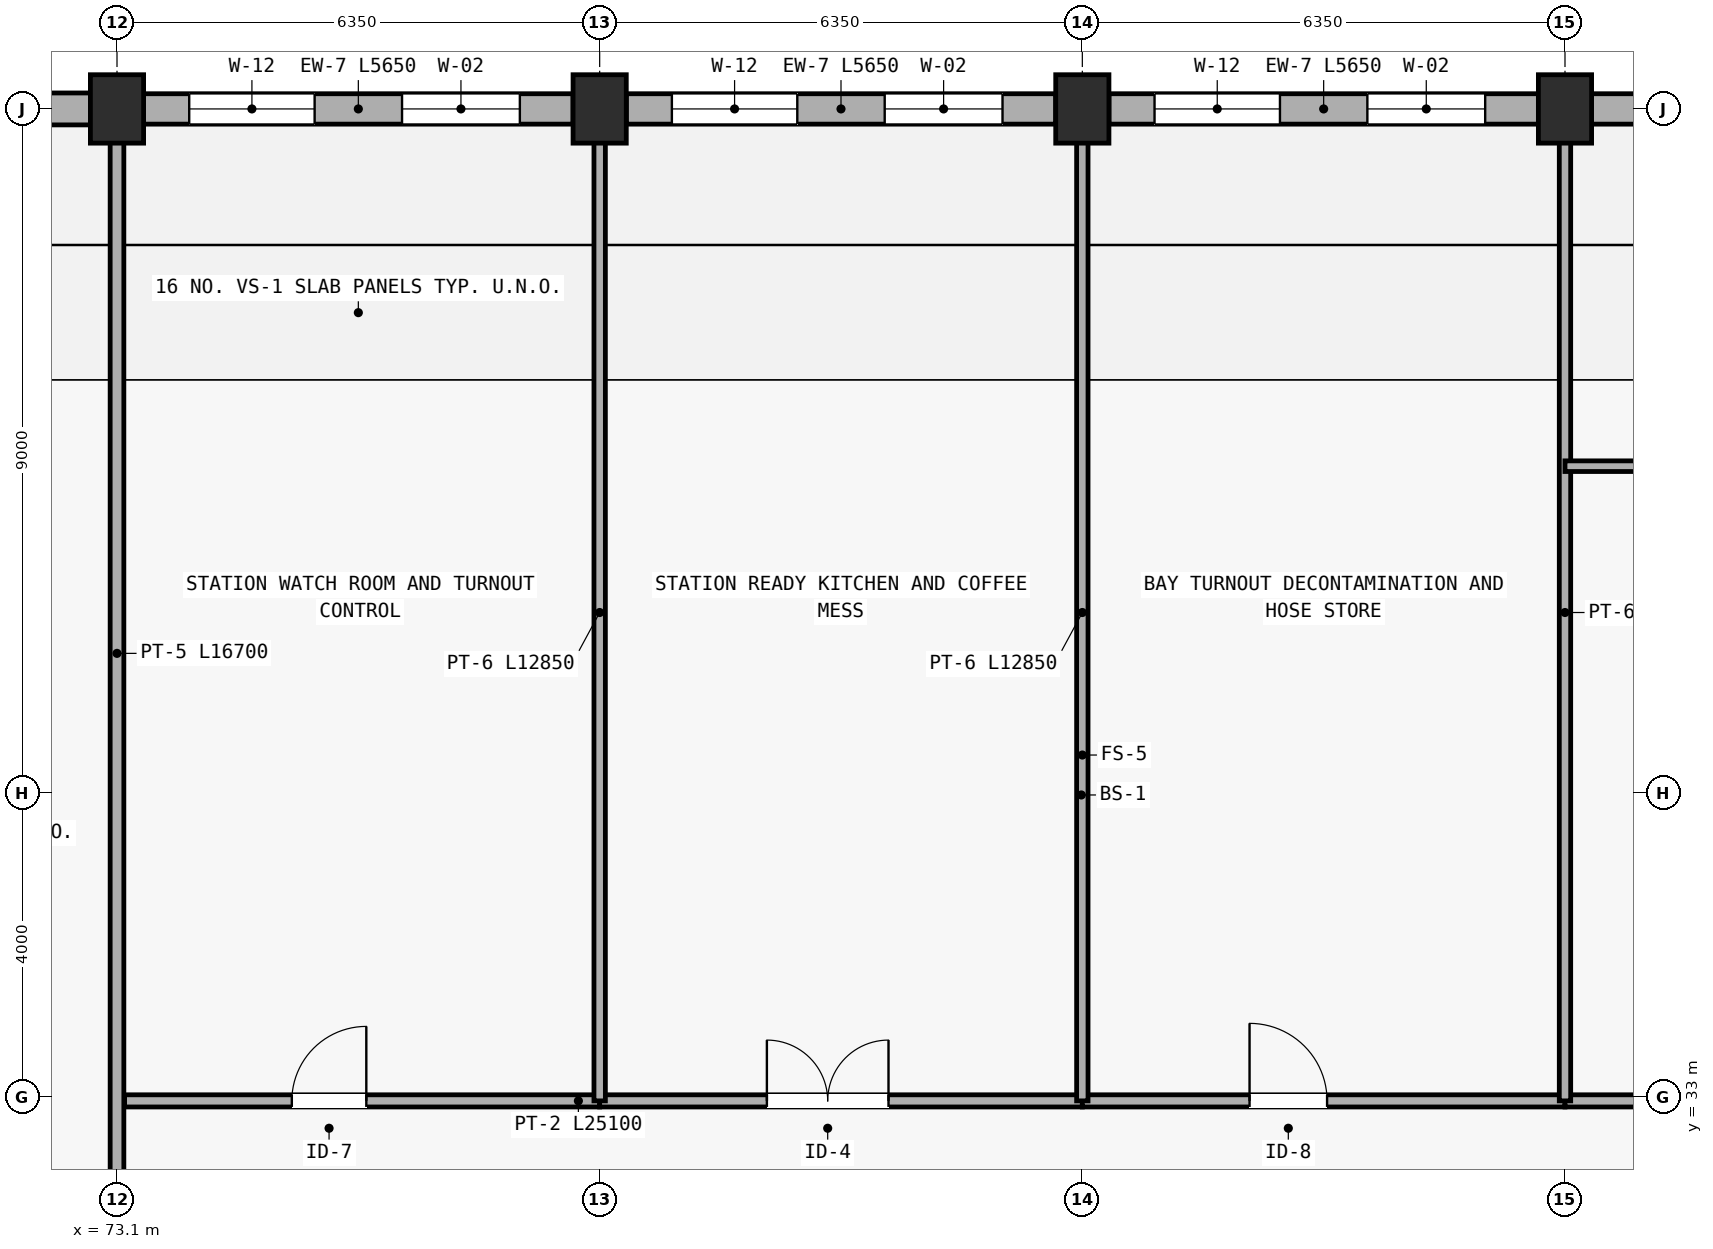
"""IFC4 building model, lengths in metres.
Left out: names, types, materials, properties, quantities, classifications, styles, units other than length and angle.
Written with IfcOpenShell. Run it as: python <this file> out.ifc"""

import sys

from ifc_helpers import new_model, si_unit, direction, frame, frame_2d, origin, origin_2d, place, context, subcontext, project, spatial, rectangle, extrude, element, fill, save


model = new_model("IFC4")
c1 = context("Model", 3, precision=1e-05, world=origin(), true_north=direction((0.0, 1.0)))
c2 = subcontext(c1, "Body", "Model", "MODEL_VIEW")
j1 = project(units=[si_unit("LENGTHUNIT", "METRE"), si_unit("PLANEANGLEUNIT", "RADIAN")], contexts=[c1])
p1 = place(None, origin())
s1 = spatial("IfcSite", under=j1, at=p1, CompositionType="ELEMENT")
p2 = place(p1, origin())
s2 = spatial("IfcBuilding", under=s1, at=p2, CompositionType="ELEMENT")
p3 = place(p2, origin())
s3 = spatial("IfcBuildingStorey", under=s2, at=p3, CompositionType="ELEMENT", Elevation=0.0)
for number, where, z_axis, x_axis in (
    (1, (73.1, 46.0, 0.0), (0.0, 0.0, 1.0), (1.0, 0.0, 0.0)),
    (2, (79.45, 46.0, 0.0), (0.0, 0.0, 1.0), (1.0, 0.0, 0.0)),
    (3, (85.8, 46.0, 0.0), (0.0, 0.0, 1.0), (1.0, 0.0, 0.0)),
    (4, (92.15, 46.0, 0.0), (0.0, 0.0, 1.0), (1.0, 0.0, 0.0)),
):
    element("IfcColumn", number, at=place(p3, frame(where, z_axis=z_axis, x_axis=x_axis)), inside=s3, PredefinedType="COLUMN", context=c2, shape_type="SweptSolid", body=[
        extrude(rectangle(XDim=0.7, YDim=0.9, at=origin_2d()), origin(), (0.0, 0.0, 1.0), 5.65),
    ])
p4 = place(p3, frame((72.75, 46.0, 0.0), z_axis=(0.0, 0.0, 1.0), x_axis=(-1.0, 0.0, 0.0)))
e5 = element("IfcWall", 5, at=p4, inside=s3, PredefinedType="STANDARD", context=c2, shape_type="SweptSolid", body=[
    extrude(rectangle(XDim=5.65, YDim=0.42, at=frame_2d((2.825, 0.0))), origin(), (0.0, 0.0, 1.0), 4.84),
])
p5 = place(p4, frame((0.675, 0.0, 0.0)))
e6 = element("IfcOpeningElement", 6, at=p5, cuts=e5, PredefinedType="OPENING", context=c2, shape_type="SweptSolid", body=[
    extrude(rectangle(XDim=4.3, YDim=4.4, at=frame_2d((2.15, 2.2))), frame((0.0, 0.22, 0.0), z_axis=(0.0, -1.0, 0.0), x_axis=(1.0, 0.0, 0.0)), (0.0, 0.0, 1.0), 0.44),
])
p6 = place(p3, frame((79.1, 46.0, 0.0), z_axis=(0.0, 0.0, 1.0), x_axis=(-1.0, 0.0, 0.0)))
e7 = element("IfcWall", 7, at=p6, inside=s3, PredefinedType="STANDARD", context=c2, shape_type="SweptSolid", body=[
    extrude(rectangle(XDim=5.65, YDim=0.4, at=frame_2d((2.825, 0.0))), origin(), (0.0, 0.0, 1.0), 3.8),
])
p7 = place(p6, frame((0.7, 0.0, 0.95)))
e8 = element("IfcOpeningElement", 8, at=p7, cuts=e7, PredefinedType="OPENING", context=c2, shape_type="SweptSolid", body=[
    extrude(rectangle(XDim=1.55, YDim=1.55, at=frame_2d((0.775, 0.775))), frame((0.0, 0.21, 0.0), z_axis=(0.0, -1.0, 0.0), x_axis=(1.0, 0.0, 0.0)), (0.0, 0.0, 1.0), 0.42),
])
p8 = place(p6, frame((3.4, 0.0, 0.95)))
e9 = element("IfcOpeningElement", 9, at=p8, cuts=e7, PredefinedType="OPENING", context=c2, shape_type="SweptSolid", body=[
    extrude(rectangle(XDim=1.65, YDim=1.45, at=frame_2d((0.825, 0.725))), frame((0.0, 0.21, 0.0), z_axis=(0.0, -1.0, 0.0), x_axis=(1.0, 0.0, 0.0)), (0.0, 0.0, 1.0), 0.42),
])
p9 = place(p3, frame((85.45, 46.0, 0.0), z_axis=(0.0, 0.0, 1.0), x_axis=(-1.0, 0.0, 0.0)))
e10 = element("IfcWall", 10, at=p9, inside=s3, PredefinedType="STANDARD", context=c2, shape_type="SweptSolid", body=[
    extrude(rectangle(XDim=5.65, YDim=0.4, at=frame_2d((2.825, 0.0))), origin(), (0.0, 0.0, 1.0), 3.8),
])
p10 = place(p9, frame((0.7, 0.0, 0.95)))
e11 = element("IfcOpeningElement", 11, at=p10, cuts=e10, PredefinedType="OPENING", context=c2, shape_type="SweptSolid", body=[
    extrude(rectangle(XDim=1.55, YDim=1.55, at=frame_2d((0.775, 0.775))), frame((0.0, 0.21, 0.0), z_axis=(0.0, -1.0, 0.0), x_axis=(1.0, 0.0, 0.0)), (0.0, 0.0, 1.0), 0.42),
])
p11 = place(p9, frame((3.4, 0.0, 0.95)))
e12 = element("IfcOpeningElement", 12, at=p11, cuts=e10, PredefinedType="OPENING", context=c2, shape_type="SweptSolid", body=[
    extrude(rectangle(XDim=1.65, YDim=1.45, at=frame_2d((0.825, 0.725))), frame((0.0, 0.21, 0.0), z_axis=(0.0, -1.0, 0.0), x_axis=(1.0, 0.0, 0.0)), (0.0, 0.0, 1.0), 0.42),
])
p12 = place(p3, frame((91.8, 46.0, 0.0), z_axis=(0.0, 0.0, 1.0), x_axis=(-1.0, 0.0, 0.0)))
e13 = element("IfcWall", 13, at=p12, inside=s3, PredefinedType="STANDARD", context=c2, shape_type="SweptSolid", body=[
    extrude(rectangle(XDim=5.65, YDim=0.4, at=frame_2d((2.825, 0.0))), origin(), (0.0, 0.0, 1.0), 3.8),
])
p13 = place(p12, frame((0.7, 0.0, 0.95)))
e14 = element("IfcOpeningElement", 14, at=p13, cuts=e13, PredefinedType="OPENING", context=c2, shape_type="SweptSolid", body=[
    extrude(rectangle(XDim=1.55, YDim=1.55, at=frame_2d((0.775, 0.775))), frame((0.0, 0.21, 0.0), z_axis=(0.0, -1.0, 0.0), x_axis=(1.0, 0.0, 0.0)), (0.0, 0.0, 1.0), 0.42),
])
p14 = place(p12, frame((3.4, 0.0, 0.95)))
e15 = element("IfcOpeningElement", 15, at=p14, cuts=e13, PredefinedType="OPENING", context=c2, shape_type="SweptSolid", body=[
    extrude(rectangle(XDim=1.65, YDim=1.45, at=frame_2d((0.825, 0.725))), frame((0.0, 0.21, 0.0), z_axis=(0.0, -1.0, 0.0), x_axis=(1.0, 0.0, 0.0)), (0.0, 0.0, 1.0), 0.42),
])
p15 = place(p3, frame((98.15, 46.0, 0.0), z_axis=(0.0, 0.0, 1.0), x_axis=(-1.0, 0.0, 0.0)))
e16 = element("IfcWall", 16, at=p15, inside=s3, PredefinedType="STANDARD", context=c2, shape_type="SweptSolid", body=[
    extrude(rectangle(XDim=5.65, YDim=0.4, at=frame_2d((2.825, 0.0))), origin(), (0.0, 0.0, 1.0), 3.8),
])
p16 = place(p15, frame((0.7, 0.0, 0.95)))
e17 = element("IfcOpeningElement", 17, at=p16, cuts=e16, PredefinedType="OPENING", context=c2, shape_type="SweptSolid", body=[
    extrude(rectangle(XDim=1.55, YDim=1.55, at=frame_2d((0.775, 0.775))), frame((0.0, 0.21, 0.0), z_axis=(0.0, -1.0, 0.0), x_axis=(1.0, 0.0, 0.0)), (0.0, 0.0, 1.0), 0.42),
])
p17 = place(p15, frame((3.4, 0.0, 0.95)))
e18 = element("IfcOpeningElement", 18, at=p17, cuts=e16, PredefinedType="OPENING", context=c2, shape_type="SweptSolid", body=[
    extrude(rectangle(XDim=1.65, YDim=1.45, at=frame_2d((0.825, 0.725))), frame((0.0, 0.21, 0.0), z_axis=(0.0, -1.0, 0.0), x_axis=(1.0, 0.0, 0.0)), (0.0, 0.0, 1.0), 0.42),
])
p18 = place(p3, frame((73.1, 29.1, 0.0), z_axis=(0.0, 0.0, 1.0), x_axis=(0.0, 1.0, 0.0)))
e19 = element("IfcWall", 19, at=p18, inside=s3, PredefinedType="PARTITIONING", context=c2, shape_type="SweptSolid", body=[
    extrude(rectangle(XDim=16.7, YDim=0.18, at=frame_2d((8.35, 0.0))), origin(), (0.0, 0.0, 1.0), 3.928),
])
p19 = place(p18, frame((1.4, 0.0, 0.0)))
e20 = element("IfcOpeningElement", 20, at=p19, cuts=e19, PredefinedType="OPENING", context=c2, shape_type="SweptSolid", body=[
    extrude(rectangle(XDim=1.05, YDim=2.14, at=frame_2d((0.525, 1.07))), frame((0.0, 0.1, 0.0), z_axis=(0.0, -1.0, 0.0), x_axis=(1.0, 0.0, 0.0)), (0.0, 0.0, 1.0), 0.2),
])
p20 = place(p3, frame((73.2, 32.95, 0.0), z_axis=(0.0, 0.0, 1.0), x_axis=(1.0, 0.0, 0.0)))
e21 = element("IfcWall", 21, at=p20, inside=s3, PredefinedType="PARTITIONING", context=c2, shape_type="SweptSolid", body=[
    extrude(rectangle(XDim=6.25, YDim=0.16, at=frame_2d((3.125, 0.0))), origin(), (0.0, 0.0, 1.0), 4.4),
])
p21 = place(p20, frame((2.2, 0.0, 0.0)))
e22 = element("IfcOpeningElement", 22, at=p21, cuts=e21, PredefinedType="OPENING", context=c2, shape_type="SweptSolid", body=[
    extrude(rectangle(XDim=0.98, YDim=2.12, at=frame_2d((0.49, 1.06))), frame((0.0, 0.09, 0.0), z_axis=(0.0, -1.0, 0.0), x_axis=(1.0, 0.0, 0.0)), (0.0, 0.0, 1.0), 0.18),
])
p22 = place(p3, frame((79.45, 32.95, 0.0), z_axis=(0.0, 0.0, 1.0), x_axis=(1.0, 0.0, 0.0)))
e23 = element("IfcWall", 23, at=p22, inside=s3, PredefinedType="PARTITIONING", context=c2, shape_type="SweptSolid", body=[
    extrude(rectangle(XDim=6.35, YDim=0.16, at=frame_2d((3.175, 0.0))), origin(), (0.0, 0.0, 1.0), 4.4),
])
p23 = place(p22, frame((2.2, 0.0, 0.0)))
e24 = element("IfcOpeningElement", 24, at=p23, cuts=e23, PredefinedType="OPENING", context=c2, shape_type="SweptSolid", body=[
    extrude(rectangle(XDim=1.6, YDim=2.14, at=frame_2d((0.8, 1.07))), frame((0.0, 0.09, 0.0), z_axis=(0.0, -1.0, 0.0), x_axis=(1.0, 0.0, 0.0)), (0.0, 0.0, 1.0), 0.18),
])
p24 = place(p3, frame((85.8, 32.95, 0.0), z_axis=(0.0, 0.0, 1.0), x_axis=(1.0, 0.0, 0.0)))
e25 = element("IfcWall", 25, at=p24, inside=s3, PredefinedType="PARTITIONING", context=c2, shape_type="SweptSolid", body=[
    extrude(rectangle(XDim=6.35, YDim=0.16, at=frame_2d((3.175, 0.0))), origin(), (0.0, 0.0, 1.0), 4.4),
])
p25 = place(p24, frame((2.2, 0.0, 0.0)))
e26 = element("IfcOpeningElement", 26, at=p25, cuts=e25, PredefinedType="OPENING", context=c2, shape_type="SweptSolid", body=[
    extrude(rectangle(XDim=1.02, YDim=2.14, at=frame_2d((0.51, 1.07))), frame((0.0, 0.09, 0.0), z_axis=(0.0, -1.0, 0.0), x_axis=(1.0, 0.0, 0.0)), (0.0, 0.0, 1.0), 0.18),
])
p26 = place(p3, frame((92.15, 32.95, 0.0), z_axis=(0.0, 0.0, 1.0), x_axis=(1.0, 0.0, 0.0)))
e27 = element("IfcWall", 27, at=p26, inside=s3, PredefinedType="PARTITIONING", context=c2, shape_type="SweptSolid", body=[
    extrude(rectangle(XDim=6.15, YDim=0.16, at=frame_2d((3.075, 0.0))), origin(), (0.0, 0.0, 1.0), 4.4),
])
p27 = place(p26, frame((2.2, 0.0, 0.0)))
e28 = element("IfcOpeningElement", 28, at=p27, cuts=e27, PredefinedType="OPENING", context=c2, shape_type="SweptSolid", body=[
    extrude(rectangle(XDim=1.0, YDim=2.12, at=frame_2d((0.5, 1.06))), frame((0.0, 0.09, 0.0), z_axis=(0.0, -1.0, 0.0), x_axis=(1.0, 0.0, 0.0)), (0.0, 0.0, 1.0), 0.18),
])
for number, where, z_axis, x_axis in (
    (29, (79.45, 32.95, 0.0), (0.0, 0.0, 1.0), (0.0, 1.0, 0.0)),
    (30, (85.8, 32.95, 0.0), (0.0, 0.0, 1.0), (0.0, 1.0, 0.0)),
    (31, (92.15, 32.95, 0.0), (0.0, 0.0, 1.0), (0.0, 1.0, 0.0)),
):
    element("IfcWall", number, at=place(p3, frame(where, z_axis=z_axis, x_axis=x_axis)), inside=s3, PredefinedType="PARTITIONING", context=c2, shape_type="SweptSolid", body=[
        extrude(rectangle(XDim=12.85, YDim=0.15, at=frame_2d((6.425, 0.0))), origin(), (0.0, 0.0, 1.0), 3.928),
    ])
p28 = place(p3, frame((92.15, 41.3, 0.0), z_axis=(0.0, 0.0, 1.0), x_axis=(1.0, 0.0, 0.0)))
e32 = element("IfcWall", 32, at=p28, inside=s3, PredefinedType="PARTITIONING", context=c2, shape_type="SweptSolid", body=[
    extrude(rectangle(XDim=6.15, YDim=0.14, at=frame_2d((3.075, 0.0))), origin(), (0.0, 0.0, 1.0), 4.4),
])
p29 = place(p28, frame((2.2, 0.0, 0.0)))
e33 = element("IfcOpeningElement", 33, at=p29, cuts=e32, PredefinedType="OPENING", context=c2, shape_type="SweptSolid", body=[
    extrude(rectangle(XDim=0.9, YDim=2.08, at=frame_2d((0.45, 1.04))), frame((0.0, 0.08, 0.0), z_axis=(0.0, -1.0, 0.0), x_axis=(1.0, 0.0, 0.0)), (0.0, 0.0, 1.0), 0.16),
])
p30 = place(p7, origin())
e34 = element("IfcWindow", 34, at=p30, inside=s3, PartitioningType="DOUBLE_PANEL_VERTICAL", PredefinedType="WINDOW", context=c2, shape_type="SweptSolid", body=[
    extrude(rectangle(XDim=1.55, YDim=1.55, at=frame_2d((0.775, 0.775))), frame((0.0, 0.03, 0.0), z_axis=(0.0, -1.0, 0.0), x_axis=(1.0, 0.0, 0.0)), (0.0, 0.0, 1.0), 0.06),
])
fill(e8, e34)
p31 = place(p8, origin())
e35 = element("IfcWindow", 35, at=p31, inside=s3, PartitioningType="DOUBLE_PANEL_VERTICAL", PredefinedType="WINDOW", context=c2, shape_type="SweptSolid", body=[
    extrude(rectangle(XDim=1.65, YDim=1.45, at=frame_2d((0.825, 0.725))), frame((0.0, 0.03, 0.0), z_axis=(0.0, -1.0, 0.0), x_axis=(1.0, 0.0, 0.0)), (0.0, 0.0, 1.0), 0.06),
])
fill(e9, e35)
p32 = place(p10, origin())
e36 = element("IfcWindow", 36, at=p32, inside=s3, PartitioningType="DOUBLE_PANEL_VERTICAL", PredefinedType="WINDOW", context=c2, shape_type="SweptSolid", body=[
    extrude(rectangle(XDim=1.55, YDim=1.55, at=frame_2d((0.775, 0.775))), frame((0.0, 0.03, 0.0), z_axis=(0.0, -1.0, 0.0), x_axis=(1.0, 0.0, 0.0)), (0.0, 0.0, 1.0), 0.06),
])
fill(e11, e36)
p33 = place(p11, origin())
e37 = element("IfcWindow", 37, at=p33, inside=s3, PartitioningType="DOUBLE_PANEL_VERTICAL", PredefinedType="WINDOW", context=c2, shape_type="SweptSolid", body=[
    extrude(rectangle(XDim=1.65, YDim=1.45, at=frame_2d((0.825, 0.725))), frame((0.0, 0.03, 0.0), z_axis=(0.0, -1.0, 0.0), x_axis=(1.0, 0.0, 0.0)), (0.0, 0.0, 1.0), 0.06),
])
fill(e12, e37)
p34 = place(p13, origin())
e38 = element("IfcWindow", 38, at=p34, inside=s3, PartitioningType="DOUBLE_PANEL_VERTICAL", PredefinedType="WINDOW", context=c2, shape_type="SweptSolid", body=[
    extrude(rectangle(XDim=1.55, YDim=1.55, at=frame_2d((0.775, 0.775))), frame((0.0, 0.03, 0.0), z_axis=(0.0, -1.0, 0.0), x_axis=(1.0, 0.0, 0.0)), (0.0, 0.0, 1.0), 0.06),
])
fill(e14, e38)
p35 = place(p14, origin())
e39 = element("IfcWindow", 39, at=p35, inside=s3, PartitioningType="DOUBLE_PANEL_VERTICAL", PredefinedType="WINDOW", context=c2, shape_type="SweptSolid", body=[
    extrude(rectangle(XDim=1.65, YDim=1.45, at=frame_2d((0.825, 0.725))), frame((0.0, 0.03, 0.0), z_axis=(0.0, -1.0, 0.0), x_axis=(1.0, 0.0, 0.0)), (0.0, 0.0, 1.0), 0.06),
])
fill(e15, e39)
p36 = place(p21, origin())
e40 = element("IfcDoor", 40, at=p36, inside=s3, OperationType="SINGLE_SWING_RIGHT", PredefinedType="DOOR", context=c2, shape_type="SweptSolid", body=[
    extrude(rectangle(XDim=0.98, YDim=2.12, at=frame_2d((0.49, 1.06))), frame((0.0, 0.025, 0.0), z_axis=(0.0, -1.0, 0.0), x_axis=(1.0, 0.0, 0.0)), (0.0, 0.0, 1.0), 0.05),
])
fill(e22, e40)
p37 = place(p23, origin())
e41 = element("IfcDoor", 41, at=p37, inside=s3, OperationType="DOUBLE_DOOR_SINGLE_SWING", PredefinedType="DOOR", context=c2, shape_type="SweptSolid", body=[
    extrude(rectangle(XDim=1.6, YDim=2.14, at=frame_2d((0.8, 1.07))), frame((0.0, 0.025, 0.0), z_axis=(0.0, -1.0, 0.0), x_axis=(1.0, 0.0, 0.0)), (0.0, 0.0, 1.0), 0.05),
])
fill(e24, e41)
p38 = place(p25, origin())
e42 = element("IfcDoor", 42, at=p38, inside=s3, OperationType="SINGLE_SWING_LEFT", PredefinedType="DOOR", context=c2, shape_type="SweptSolid", body=[
    extrude(rectangle(XDim=1.02, YDim=2.14, at=frame_2d((0.51, 1.07))), frame((0.0, 0.025, 0.0), z_axis=(0.0, -1.0, 0.0), x_axis=(1.0, 0.0, 0.0)), (0.0, 0.0, 1.0), 0.05),
])
fill(e26, e42)
save(model, sys.argv[1])
